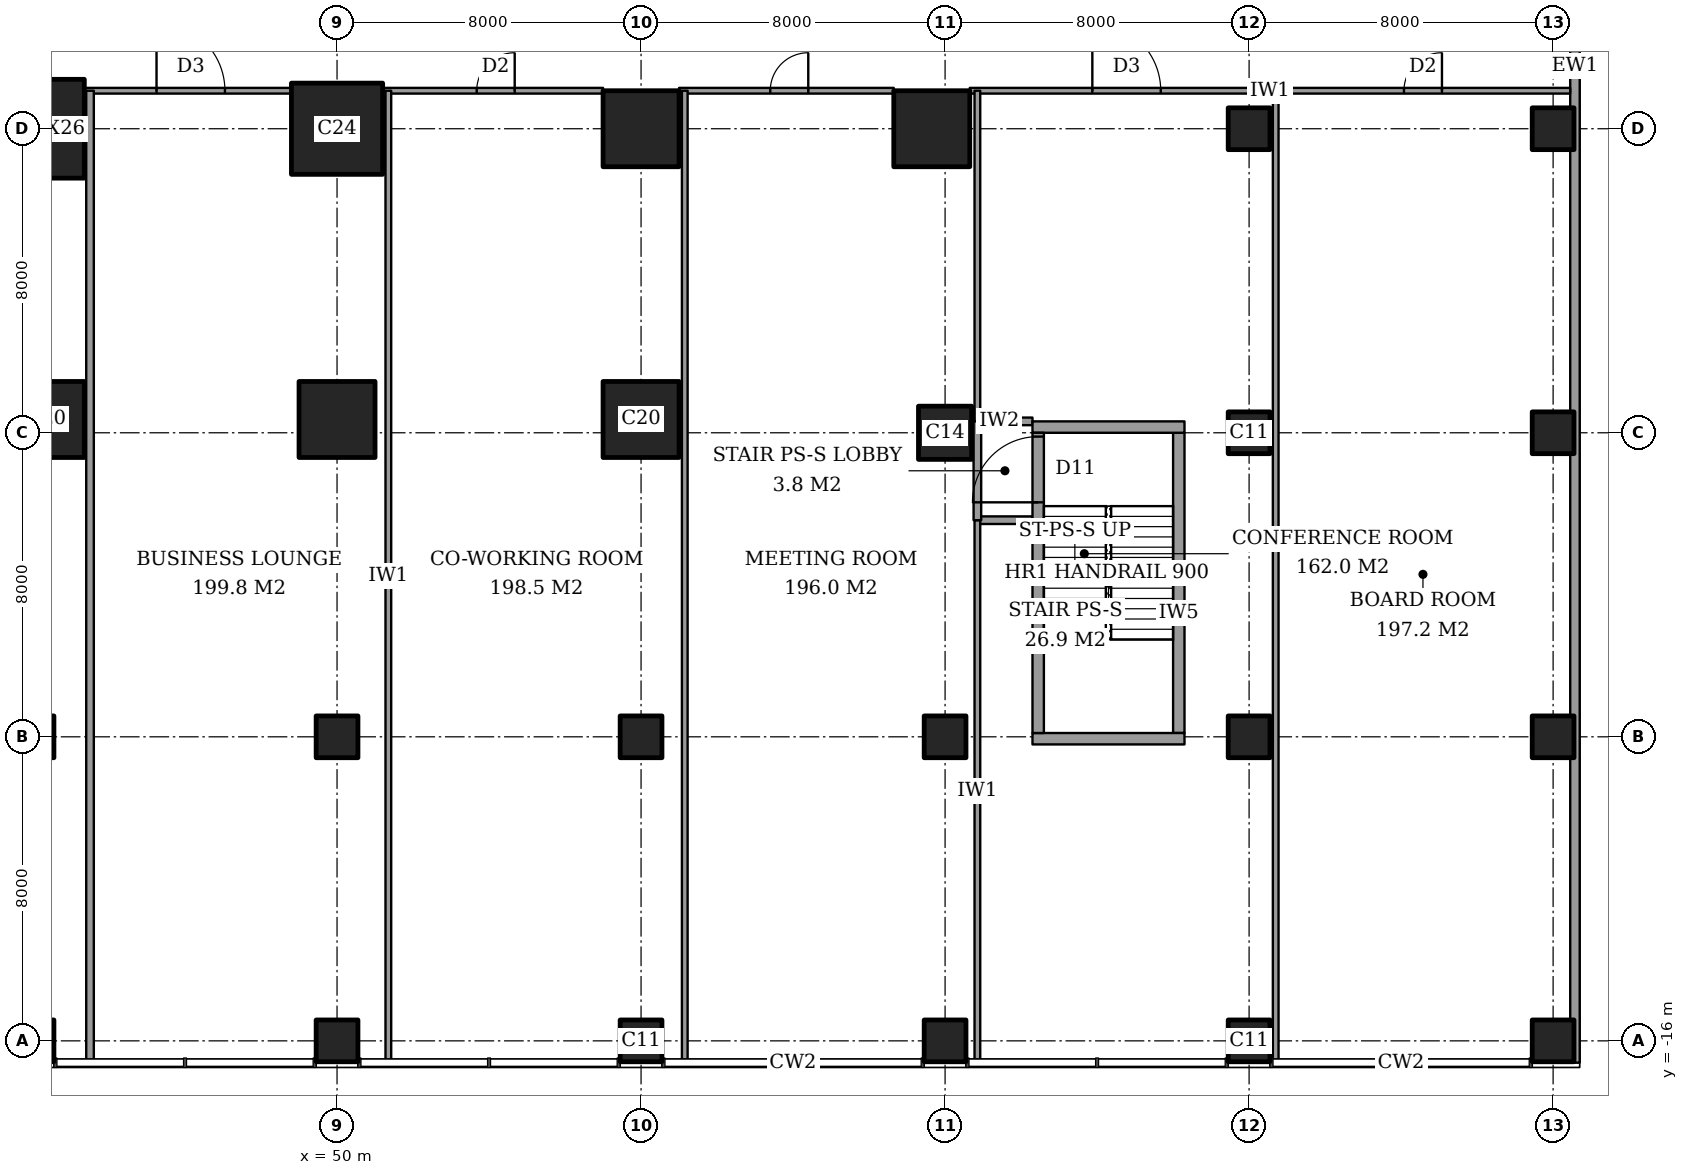
"""IFC4 building model, lengths in metres.
Left out: names, types, materials, properties, quantities, classifications, styles, units other than length and angle.
Written with IfcOpenShell. Run it as: python <this file> out.ifc"""

import sys

from ifc_helpers import new_model, si_unit, direction, frame, frame_2d, origin, origin_2d, place, context, subcontext, project, spatial, rectangle, extrude, element, fill, save


model = new_model("IFC4")
c1 = context("Model", 3, precision=1e-05, world=origin(), true_north=direction((0.0, 1.0)))
c2 = subcontext(c1, "Body", "Model", "MODEL_VIEW")
j1 = project(units=[si_unit("LENGTHUNIT", "METRE"), si_unit("PLANEANGLEUNIT", "RADIAN")], contexts=[c1])
p1 = place(None, origin())
s1 = spatial("IfcSite", under=j1, at=p1, CompositionType="ELEMENT")
p2 = place(p1, origin())
s2 = spatial("IfcBuilding", under=s1, at=p2, CompositionType="ELEMENT")
p3 = place(p2, frame((0.0, 0.0, 6.0)))
s3 = spatial("IfcBuildingStorey", under=s2, at=p3, CompositionType="ELEMENT", Elevation=6.0)
for number, where, z_axis, x_axis in (
    (1, (42.0, -16.0, 0.0), (0.0, 0.0, 1.0), (1.0, 0.0, 0.0)),
    (2, (42.0, -8.0, 0.0), (0.0, 0.0, 1.0), (1.0, 0.0, 0.0)),
):
    element("IfcColumn", number, at=place(p3, frame(where, z_axis=z_axis, x_axis=x_axis)), inside=s3, PredefinedType="COLUMN", context=c2, shape_type="SweptSolid", body=[
        extrude(rectangle(XDim=1.1, YDim=1.1, at=origin_2d()), origin(), (0.0, 0.0, 1.0), 5.0),
    ])
p4 = place(p3, frame((42.35, 0.35, 0.0), z_axis=(0.0, 0.0, 1.0), x_axis=(1.0, 0.0, 0.0)))
e3 = element("IfcColumn", 3, at=p4, inside=s3, PredefinedType="COLUMN", context=c2, shape_type="SweptSolid", body=[
    extrude(rectangle(XDim=2.0, YDim=2.0, at=origin_2d()), origin(), (0.0, 0.0, 1.0), 5.0),
])
p5 = place(p3, frame((42.35, 8.0, 0.0), z_axis=(0.0, 0.0, 1.0), x_axis=(1.0, 0.0, 0.0)))
e4 = element("IfcColumn", 4, at=p5, inside=s3, PredefinedType="COLUMN", context=c2, shape_type="SweptSolid", body=[
    extrude(rectangle(XDim=2.0, YDim=2.6, at=origin_2d()), origin(), (0.0, 0.0, 1.0), 5.0),
])
for number, where, z_axis, x_axis in (
    (5, (50.0, -16.0, 0.0), (0.0, 0.0, 1.0), (1.0, 0.0, 0.0)),
    (6, (50.0, -8.0, 0.0), (0.0, 0.0, 1.0), (1.0, 0.0, 0.0)),
):
    element("IfcColumn", number, at=place(p3, frame(where, z_axis=z_axis, x_axis=x_axis)), inside=s3, PredefinedType="COLUMN", context=c2, shape_type="SweptSolid", body=[
        extrude(rectangle(XDim=1.1, YDim=1.1, at=origin_2d()), origin(), (0.0, 0.0, 1.0), 5.0),
    ])
p6 = place(p3, frame((50.0, 0.35, 0.0), z_axis=(0.0, 0.0, 1.0), x_axis=(1.0, 0.0, 0.0)))
e7 = element("IfcColumn", 7, at=p6, inside=s3, PredefinedType="COLUMN", context=c2, shape_type="SweptSolid", body=[
    extrude(rectangle(XDim=2.0, YDim=2.0, at=origin_2d()), origin(), (0.0, 0.0, 1.0), 5.0),
])
p7 = place(p3, frame((50.0, 8.0, 0.0), z_axis=(0.0, 0.0, 1.0), x_axis=(1.0, 0.0, 0.0)))
e8 = element("IfcColumn", 8, at=p7, inside=s3, PredefinedType="COLUMN", context=c2, shape_type="SweptSolid", body=[
    extrude(rectangle(XDim=2.4, YDim=2.4, at=origin_2d()), origin(), (0.0, 0.0, 1.0), 5.0),
])
for number, where, z_axis, x_axis in (
    (9, (58.0, -16.0, 0.0), (0.0, 0.0, 1.0), (1.0, 0.0, 0.0)),
    (10, (58.0, -8.0, 0.0), (0.0, 0.0, 1.0), (1.0, 0.0, 0.0)),
):
    element("IfcColumn", number, at=place(p3, frame(where, z_axis=z_axis, x_axis=x_axis)), inside=s3, PredefinedType="COLUMN", context=c2, shape_type="SweptSolid", body=[
        extrude(rectangle(XDim=1.1, YDim=1.1, at=origin_2d()), origin(), (0.0, 0.0, 1.0), 5.0),
    ])
for number, where, z_axis, x_axis in (
    (11, (58.0, 0.35, 0.0), (0.0, 0.0, 1.0), (1.0, 0.0, 0.0)),
    (12, (58.0, 8.0, 0.0), (0.0, 0.0, 1.0), (1.0, 0.0, 0.0)),
):
    element("IfcColumn", number, at=place(p3, frame(where, z_axis=z_axis, x_axis=x_axis)), inside=s3, PredefinedType="COLUMN", context=c2, shape_type="SweptSolid", body=[
        extrude(rectangle(XDim=2.0, YDim=2.0, at=origin_2d()), origin(), (0.0, 0.0, 1.0), 5.0),
    ])
for number, where, z_axis, x_axis in (
    (13, (66.0, -16.0, 0.0), (0.0, 0.0, 1.0), (1.0, 0.0, 0.0)),
    (14, (66.0, -8.0, 0.0), (0.0, 0.0, 1.0), (1.0, 0.0, 0.0)),
):
    element("IfcColumn", number, at=place(p3, frame(where, z_axis=z_axis, x_axis=x_axis)), inside=s3, PredefinedType="COLUMN", context=c2, shape_type="SweptSolid", body=[
        extrude(rectangle(XDim=1.1, YDim=1.1, at=origin_2d()), origin(), (0.0, 0.0, 1.0), 5.0),
    ])
p8 = place(p3, frame((66.0, 0.0, 0.0), z_axis=(0.0, 0.0, 1.0), x_axis=(1.0, 0.0, 0.0)))
e15 = element("IfcColumn", 15, at=p8, inside=s3, PredefinedType="COLUMN", context=c2, shape_type="SweptSolid", body=[
    extrude(rectangle(XDim=1.4, YDim=1.4, at=origin_2d()), origin(), (0.0, 0.0, 1.0), 5.0),
])
p9 = place(p3, frame((65.65, 8.0, 0.0), z_axis=(0.0, 0.0, 1.0), x_axis=(1.0, 0.0, 0.0)))
e16 = element("IfcColumn", 16, at=p9, inside=s3, PredefinedType="COLUMN", context=c2, shape_type="SweptSolid", body=[
    extrude(rectangle(XDim=2.0, YDim=2.0, at=origin_2d()), origin(), (0.0, 0.0, 1.0), 5.0),
])
for number, where, z_axis, x_axis in (
    (17, (74.0, -16.0, 0.0), (0.0, 0.0, 1.0), (1.0, 0.0, 0.0)),
    (18, (74.0, -8.0, 0.0), (0.0, 0.0, 1.0), (1.0, 0.0, 0.0)),
    (19, (74.0, 0.0, 0.0), (0.0, 0.0, 1.0), (1.0, 0.0, 0.0)),
    (20, (74.0, 8.0, 0.0), (0.0, 0.0, 1.0), (1.0, 0.0, 0.0)),
    (21, (82.0, -16.0, 0.0), (0.0, 0.0, 1.0), (1.0, 0.0, 0.0)),
    (22, (82.0, -8.0, 0.0), (0.0, 0.0, 1.0), (1.0, 0.0, 0.0)),
    (23, (82.0, 0.0, 0.0), (0.0, 0.0, 1.0), (1.0, 0.0, 0.0)),
    (24, (82.0, 8.0, 0.0), (0.0, 0.0, 1.0), (1.0, 0.0, 0.0)),
):
    element("IfcColumn", number, at=place(p3, frame(where, z_axis=z_axis, x_axis=x_axis)), inside=s3, PredefinedType="COLUMN", context=c2, shape_type="SweptSolid", body=[
        extrude(rectangle(XDim=1.1, YDim=1.1, at=origin_2d()), origin(), (0.0, 0.0, 1.0), 5.0),
    ])
p10 = place(p3, frame((82.575, -16.575, 0.0), z_axis=(0.0, 0.0, 1.0), x_axis=(0.0, 1.0, 0.0)))
e25 = element("IfcWall", 25, at=p10, inside=s3, PredefinedType="SOLIDWALL", context=c2, shape_type="SweptSolid", body=[
    extrude(rectangle(XDim=52.45, YDim=0.25, at=frame_2d((26.225, 0.0))), origin(), (0.0, 0.0, 1.0), 5.0),
])
for number, where, z_axis, x_axis in (
    (26, (66.85, -2.3, 0.0), (0.0, 0.0, 1.0), (1.0, 0.0, 0.0)),
    (27, (66.85, 0.3, 0.0), (0.0, 0.0, 1.0), (1.0, 0.0, 0.0)),
):
    element("IfcWall", number, at=place(p3, frame(where, z_axis=z_axis, x_axis=x_axis)), inside=s3, PredefinedType="PARTITIONING", context=c2, shape_type="SweptSolid", body=[
        extrude(rectangle(XDim=1.45, YDim=0.2, at=frame_2d((0.725, 0.0))), origin(), (0.0, 0.0, 1.0), 4.7),
    ])
p11 = place(p3, frame((43.35, 9.0, 0.0), z_axis=(0.0, 0.0, 1.0), x_axis=(1.0, 0.0, 0.0)))
e28 = element("IfcWall", 28, at=p11, inside=s3, PredefinedType="PARTITIONING", context=c2, shape_type="SweptSolid", body=[
    extrude(rectangle(XDim=5.45, YDim=0.15, at=frame_2d((2.725, 0.0))), origin(), (0.0, 0.0, 1.0), 4.7),
])
p12 = place(p11, frame((1.9, 0.0, 0.0)))
e29 = element("IfcOpeningElement", 29, at=p12, cuts=e28, PredefinedType="OPENING", context=c2, shape_type="SweptSolid", body=[
    extrude(rectangle(XDim=1.8, YDim=2.1, at=frame_2d((0.9, 1.05))), frame((0.0, 0.085, 0.0), z_axis=(0.0, -1.0, 0.0), x_axis=(1.0, 0.0, 0.0)), (0.0, 0.0, 1.0), 0.17),
])
p13 = place(p3, frame((51.2, 9.0, 0.0), z_axis=(0.0, 0.0, 1.0), x_axis=(1.0, 0.0, 0.0)))
e30 = element("IfcWall", 30, at=p13, inside=s3, PredefinedType="PARTITIONING", context=c2, shape_type="SweptSolid", body=[
    extrude(rectangle(XDim=5.8, YDim=0.15, at=frame_2d((2.9, 0.0))), origin(), (0.0, 0.0, 1.0), 4.7),
])
p14 = place(p13, frame((2.475, 0.0, 0.0)))
e31 = element("IfcOpeningElement", 31, at=p14, cuts=e30, PredefinedType="OPENING", context=c2, shape_type="SweptSolid", body=[
    extrude(rectangle(XDim=1.0, YDim=2.1, at=frame_2d((0.5, 1.05))), frame((0.0, 0.085, 0.0), z_axis=(0.0, -1.0, 0.0), x_axis=(1.0, 0.0, 0.0)), (0.0, 0.0, 1.0), 0.17),
])
p15 = place(p3, frame((59.0, 9.0, 0.0), z_axis=(0.0, 0.0, 1.0), x_axis=(1.0, 0.0, 0.0)))
e32 = element("IfcWall", 32, at=p15, inside=s3, PredefinedType="PARTITIONING", context=c2, shape_type="SweptSolid", body=[
    extrude(rectangle(XDim=5.65, YDim=0.15, at=frame_2d((2.825, 0.0))), origin(), (0.0, 0.0, 1.0), 4.7),
])
p16 = place(p15, frame((2.4, 0.0, 0.0)))
e33 = element("IfcOpeningElement", 33, at=p16, cuts=e32, PredefinedType="OPENING", context=c2, shape_type="SweptSolid", body=[
    extrude(rectangle(XDim=1.0, YDim=2.1, at=frame_2d((0.5, 1.05))), frame((0.0, 0.085, 0.0), z_axis=(0.0, -1.0, 0.0), x_axis=(1.0, 0.0, 0.0)), (0.0, 0.0, 1.0), 0.17),
])
p17 = place(p3, frame((66.65, 9.0, 0.0), z_axis=(0.0, 0.0, 1.0), x_axis=(1.0, 0.0, 0.0)))
e34 = element("IfcWall", 34, at=p17, inside=s3, PredefinedType="PARTITIONING", context=c2, shape_type="SweptSolid", body=[
    extrude(rectangle(XDim=15.8, YDim=0.15, at=frame_2d((7.9, 0.0))), origin(), (0.0, 0.0, 1.0), 4.7),
])
p18 = place(p17, frame((3.225, 0.0, 0.0)))
e35 = element("IfcOpeningElement", 35, at=p18, cuts=e34, PredefinedType="OPENING", context=c2, shape_type="SweptSolid", body=[
    extrude(rectangle(XDim=1.8, YDim=2.1, at=frame_2d((0.9, 1.05))), frame((0.0, 0.085, 0.0), z_axis=(0.0, -1.0, 0.0), x_axis=(1.0, 0.0, 0.0)), (0.0, 0.0, 1.0), 0.17),
])
p19 = place(p17, frame((11.425, 0.0, 0.0)))
e36 = element("IfcOpeningElement", 36, at=p19, cuts=e34, PredefinedType="OPENING", context=c2, shape_type="SweptSolid", body=[
    extrude(rectangle(XDim=1.0, YDim=2.1, at=frame_2d((0.5, 1.05))), frame((0.0, 0.085, 0.0), z_axis=(0.0, -1.0, 0.0), x_axis=(1.0, 0.0, 0.0)), (0.0, 0.0, 1.0), 0.17),
])
p20 = place(p3, frame((43.5, -16.561, 0.0), z_axis=(0.0, 0.0, 1.0), x_axis=(0.0, 1.0, 0.0)))
e37 = element("IfcWall", 37, at=p20, inside=s3, PredefinedType="PARTITIONING", context=c2, shape_type="SweptSolid", body=[
    extrude(rectangle(XDim=25.561, YDim=0.2, at=frame_2d((12.781, 0.0))), origin(), (0.0, 0.0, 1.0), 4.7),
])
for number, where, z_axis, x_axis in (
    (38, (51.35, -16.561, 0.0), (0.0, 0.0, 1.0), (0.0, 1.0, 0.0)),
    (39, (59.15, -16.561, 0.0), (0.0, 0.0, 1.0), (0.0, 1.0, 0.0)),
):
    element("IfcWall", number, at=place(p3, frame(where, z_axis=z_axis, x_axis=x_axis)), inside=s3, PredefinedType="PARTITIONING", context=c2, shape_type="SweptSolid", body=[
        extrude(rectangle(XDim=25.561, YDim=0.15, at=frame_2d((12.781, 0.0))), origin(), (0.0, 0.0, 1.0), 4.7),
    ])
p21 = place(p3, frame((66.85, -2.3, 0.0), z_axis=(0.0, 0.0, 1.0), x_axis=(0.0, 1.0, 0.0)))
e40 = element("IfcWall", 40, at=p21, inside=s3, PredefinedType="PARTITIONING", context=c2, shape_type="SweptSolid", body=[
    extrude(rectangle(XDim=2.6, YDim=0.2, at=frame_2d((1.3, 0.0))), origin(), (0.0, 0.0, 1.0), 4.7),
])
p22 = place(p3, frame((66.85, -16.561, 0.0), z_axis=(0.0, 0.0, 1.0), x_axis=(0.0, 1.0, 0.0)))
e41 = element("IfcWall", 41, at=p22, inside=s3, PredefinedType="PARTITIONING", context=c2, shape_type="SweptSolid", body=[
    extrude(rectangle(XDim=14.261, YDim=0.15, at=frame_2d((7.13, 0.0))), origin(), (0.0, 0.0, 1.0), 4.7),
])
p23 = place(p3, frame((66.85, 0.3, 0.0), z_axis=(0.0, 0.0, 1.0), x_axis=(0.0, 1.0, 0.0)))
e42 = element("IfcWall", 42, at=p23, inside=s3, PredefinedType="PARTITIONING", context=c2, shape_type="SweptSolid", body=[
    extrude(rectangle(XDim=8.7, YDim=0.15, at=frame_2d((4.35, 0.0))), origin(), (0.0, 0.0, 1.0), 4.7),
])
p24 = place(p3, frame((74.7, -16.561, 0.0), z_axis=(0.0, 0.0, 1.0), x_axis=(0.0, 1.0, 0.0)))
e43 = element("IfcWall", 43, at=p24, inside=s3, PredefinedType="PARTITIONING", context=c2, shape_type="SweptSolid", body=[
    extrude(rectangle(XDim=25.561, YDim=0.15, at=frame_2d((12.781, 0.0))), origin(), (0.0, 0.0, 1.0), 4.7),
])
for number, where, z_axis, x_axis in (
    (44, (68.3, -8.05, 0.0), (0.0, 0.0, 1.0), (1.0, 0.0, 0.0)),
    (45, (68.3, 0.15, 0.0), (0.0, 0.0, 1.0), (1.0, 0.0, 0.0)),
):
    element("IfcWall", number, at=place(p3, frame(where, z_axis=z_axis, x_axis=x_axis)), inside=s3, PredefinedType="PARTITIONING", context=c2, shape_type="SweptSolid", body=[
        extrude(rectangle(XDim=4.0, YDim=0.3, at=frame_2d((2.0, 0.0))), origin(), (0.0, 0.0, 1.0), 5.0),
    ])
p25 = place(p3, frame((68.45, -7.9, 0.0), z_axis=(0.0, 0.0, 1.0), x_axis=(0.0, 1.0, 0.0)))
e46 = element("IfcWall", 46, at=p25, inside=s3, PredefinedType="PARTITIONING", context=c2, shape_type="SweptSolid", body=[
    extrude(rectangle(XDim=7.9, YDim=0.3, at=frame_2d((3.95, 0.0))), origin(), (0.0, 0.0, 1.0), 5.0),
])
p26 = place(p25, frame((6.07, 0.0, 0.0)))
e47 = element("IfcOpeningElement", 47, at=p26, cuts=e46, PredefinedType="OPENING", context=c2, shape_type="SweptSolid", body=[
    extrude(rectangle(XDim=1.73, YDim=2.1, at=frame_2d((0.865, 1.05))), frame((0.0, 0.16, 0.0), z_axis=(0.0, -1.0, 0.0), x_axis=(1.0, 0.0, 0.0)), (0.0, 0.0, 1.0), 0.32),
])
p27 = place(p3, frame((72.15, -7.9, 0.0), z_axis=(0.0, 0.0, 1.0), x_axis=(0.0, 1.0, 0.0)))
e48 = element("IfcWall", 48, at=p27, inside=s3, PredefinedType="PARTITIONING", context=c2, shape_type="SweptSolid", body=[
    extrude(rectangle(XDim=7.9, YDim=0.3, at=frame_2d((3.95, 0.0))), origin(), (0.0, 0.0, 1.0), 5.0),
])
p28 = place(p12, origin())
e49 = element("IfcDoor", 49, at=p28, inside=s3, OperationType="DOUBLE_DOOR_DOUBLE_SWING", PredefinedType="DOOR", context=c2, shape_type="SweptSolid", body=[
    extrude(rectangle(XDim=1.8, YDim=2.1, at=frame_2d((0.9, 1.05))), frame((0.0, 0.025, 0.0), z_axis=(0.0, -1.0, 0.0), x_axis=(1.0, 0.0, 0.0)), (0.0, 0.0, 1.0), 0.05),
])
fill(e29, e49)
p29 = place(p14, origin())
e50 = element("IfcDoor", 50, at=p29, inside=s3, OperationType="SINGLE_SWING_LEFT", PredefinedType="DOOR", context=c2, shape_type="SweptSolid", body=[
    extrude(rectangle(XDim=1.0, YDim=2.1, at=frame_2d((0.5, 1.05))), frame((0.0, 0.025, 0.0), z_axis=(0.0, -1.0, 0.0), x_axis=(1.0, 0.0, 0.0)), (0.0, 0.0, 1.0), 0.05),
])
fill(e31, e50)
p30 = place(p16, origin())
e51 = element("IfcDoor", 51, at=p30, inside=s3, OperationType="SINGLE_SWING_LEFT", PredefinedType="DOOR", context=c2, shape_type="SweptSolid", body=[
    extrude(rectangle(XDim=1.0, YDim=2.1, at=frame_2d((0.5, 1.05))), frame((0.0, 0.025, 0.0), z_axis=(0.0, -1.0, 0.0), x_axis=(1.0, 0.0, 0.0)), (0.0, 0.0, 1.0), 0.05),
])
fill(e33, e51)
p31 = place(p18, origin())
e52 = element("IfcDoor", 52, at=p31, inside=s3, OperationType="DOUBLE_DOOR_DOUBLE_SWING", PredefinedType="DOOR", context=c2, shape_type="SweptSolid", body=[
    extrude(rectangle(XDim=1.8, YDim=2.1, at=frame_2d((0.9, 1.05))), frame((0.0, 0.025, 0.0), z_axis=(0.0, -1.0, 0.0), x_axis=(1.0, 0.0, 0.0)), (0.0, 0.0, 1.0), 0.05),
])
fill(e35, e52)
p32 = place(p19, origin())
e53 = element("IfcDoor", 53, at=p32, inside=s3, OperationType="SINGLE_SWING_LEFT", PredefinedType="DOOR", context=c2, shape_type="SweptSolid", body=[
    extrude(rectangle(XDim=1.0, YDim=2.1, at=frame_2d((0.5, 1.05))), frame((0.0, 0.025, 0.0), z_axis=(0.0, -1.0, 0.0), x_axis=(1.0, 0.0, 0.0)), (0.0, 0.0, 1.0), 0.05),
])
fill(e36, e53)
p33 = place(p26, origin())
e54 = element("IfcDoor", 54, at=p33, inside=s3, OperationType="DOUBLE_DOOR_SINGLE_SWING", PredefinedType="DOOR", context=c2, shape_type="SweptSolid", body=[
    extrude(rectangle(XDim=1.73, YDim=2.1, at=frame_2d((0.865, 1.05))), frame((0.0, 0.025, 0.0), z_axis=(0.0, -1.0, 0.0), x_axis=(1.0, 0.0, 0.0)), (0.0, 0.0, 1.0), 0.05),
])
fill(e47, e54)
save(model, sys.argv[1])
